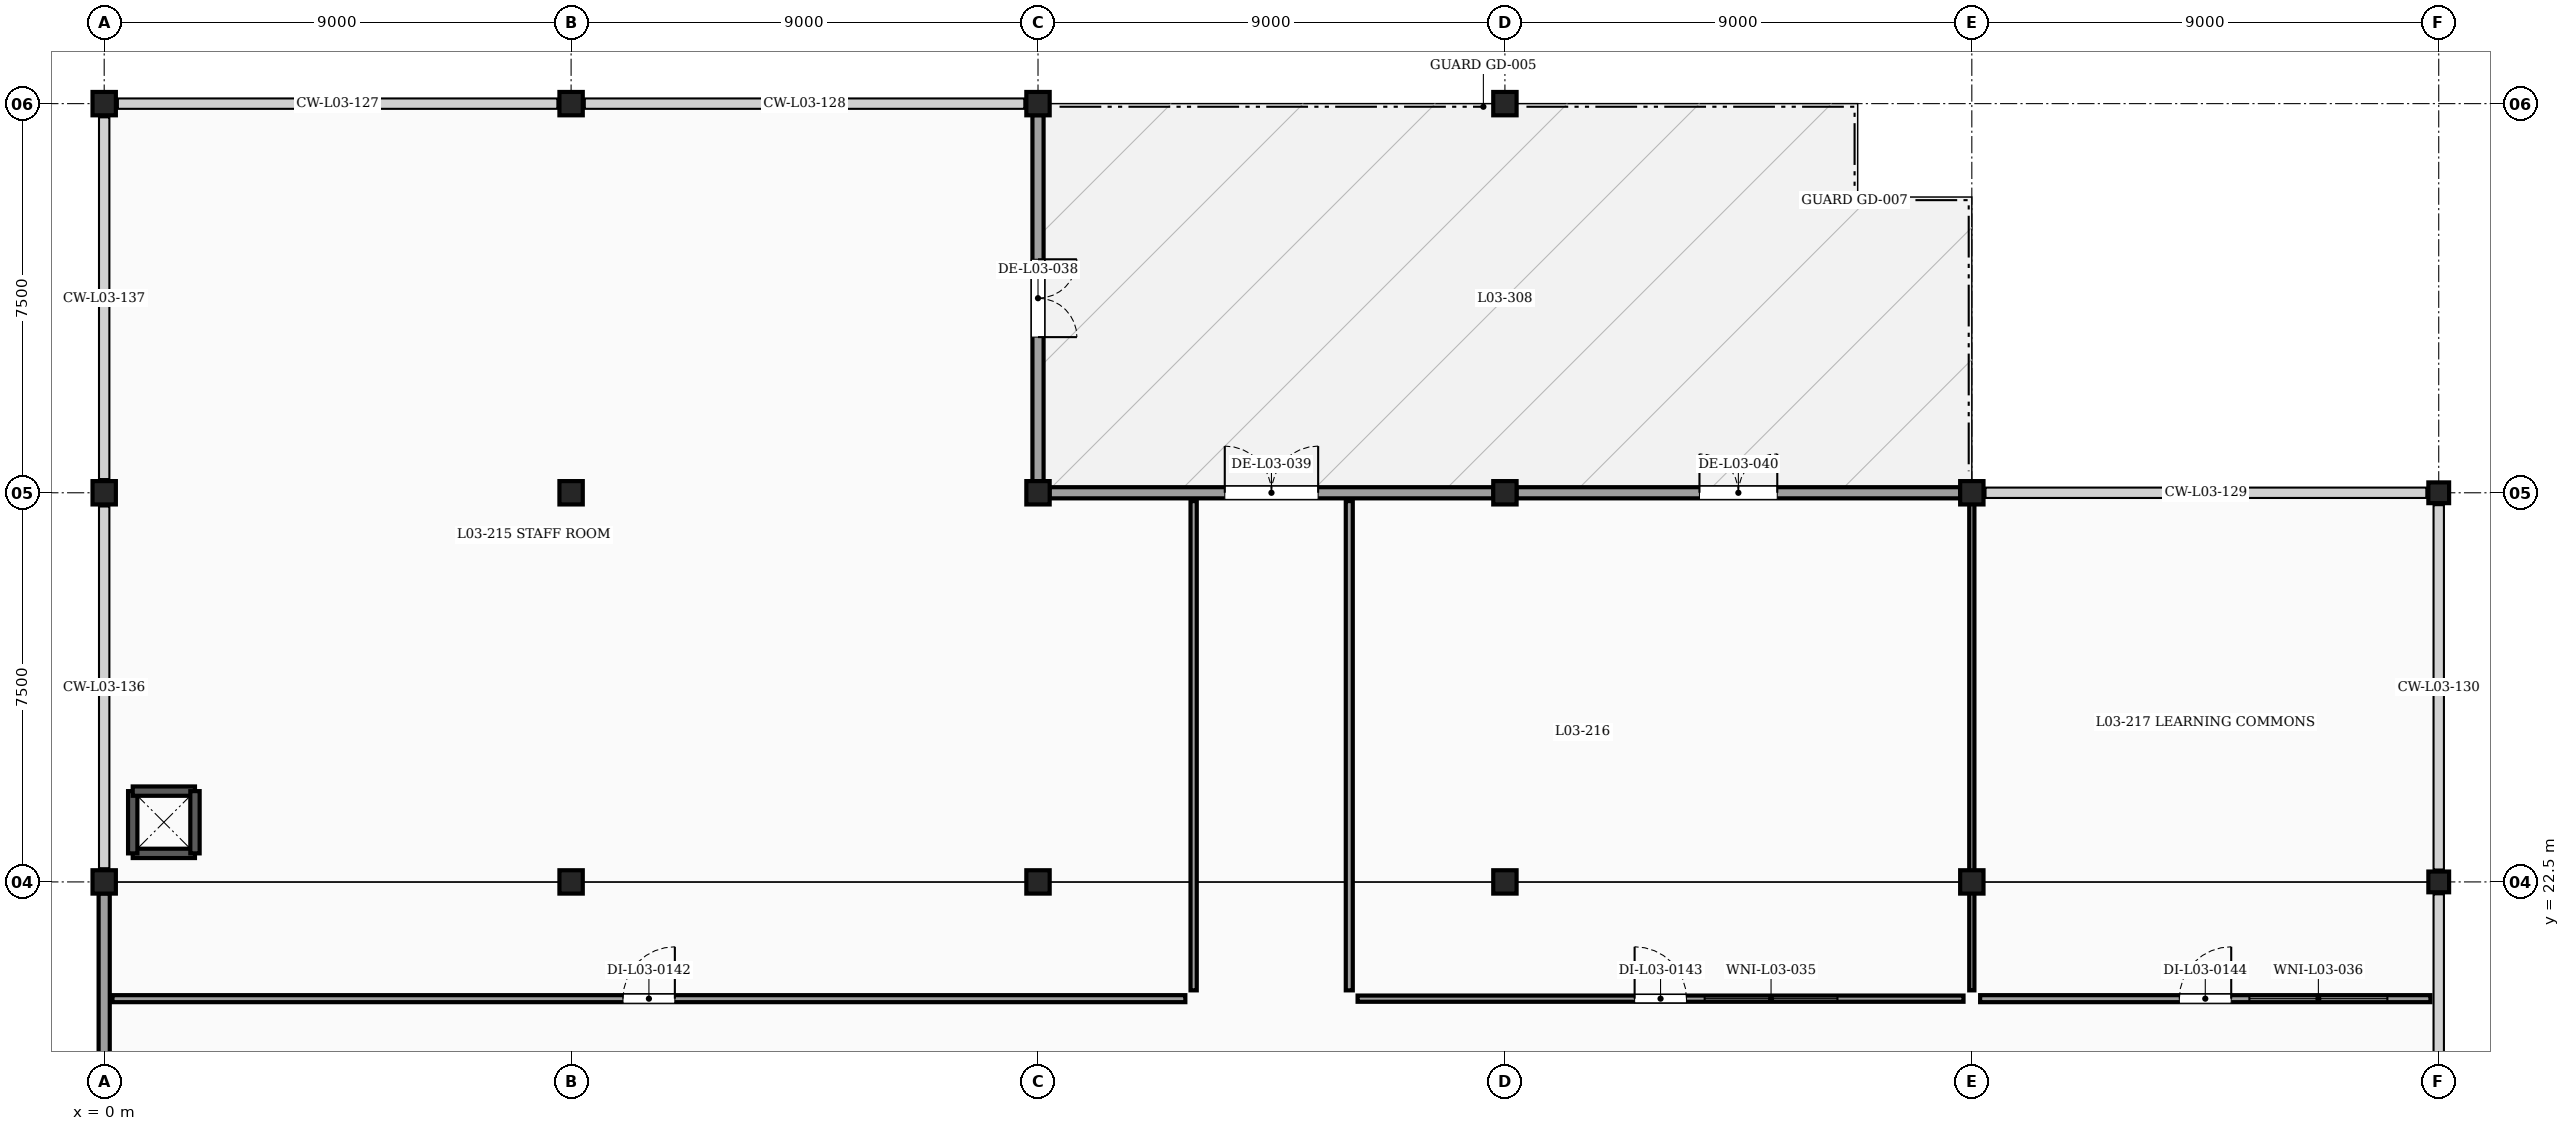
"""IFC4 building model, lengths in metres.
Left out: names, types, materials, properties, quantities, classifications, styles, units other than length and angle.
Written with IfcOpenShell. Run it as: python <this file> out.ifc"""

import sys

from ifc_helpers import new_model, si_unit, direction, frame, frame_2d, origin, origin_2d, place, context, subcontext, project, spatial, rectangle, extrude, element, fill, save


model = new_model("IFC4")
c1 = context("Model", 3, precision=1e-05, world=origin(), true_north=direction((0.0, 1.0)))
c2 = subcontext(c1, "Body", "Model", "MODEL_VIEW")
j1 = project(units=[si_unit("LENGTHUNIT", "METRE"), si_unit("PLANEANGLEUNIT", "RADIAN")], contexts=[c1])
p1 = place(None, origin())
s1 = spatial("IfcSite", under=j1, at=p1, CompositionType="ELEMENT")
p2 = place(p1, origin())
s2 = spatial("IfcBuilding", under=s1, at=p2, CompositionType="ELEMENT")
p3 = place(p2, frame((0.0, 0.0, 12.3)))
s3 = spatial("IfcBuildingStorey", under=s2, at=p3, CompositionType="ELEMENT", Elevation=12.3)
for number, where, z_axis, x_axis in (
    (1, (0.0, 22.5, 0.0), (0.0, 0.0, 1.0), (1.0, 0.0, 0.0)),
    (2, (9.0, 22.5, 0.0), (0.0, 0.0, 1.0), (1.0, 0.0, 0.0)),
    (3, (18.0, 22.5, 0.0), (0.0, 0.0, 1.0), (1.0, 0.0, 0.0)),
    (4, (27.0, 22.5, 0.0), (0.0, 0.0, 1.0), (1.0, 0.0, 0.0)),
    (5, (36.0, 22.5, 0.0), (0.0, 0.0, 1.0), (1.0, 0.0, 0.0)),
):
    element("IfcColumn", number, at=place(p3, frame(where, z_axis=z_axis, x_axis=x_axis)), inside=s3, PredefinedType="COLUMN", context=c2, shape_type="SweptSolid", body=[
        extrude(rectangle(XDim=0.45, YDim=0.45, at=origin_2d()), origin(), (0.0, 0.0, 1.0), 3.8),
    ])
p4 = place(p3, frame((45.0, 22.5, 0.0), z_axis=(0.0, 0.0, 1.0), x_axis=(1.0, 0.0, 0.0)))
e6 = element("IfcColumn", 6, at=p4, inside=s3, PredefinedType="COLUMN", context=c2, shape_type="SweptSolid", body=[
    extrude(rectangle(XDim=0.4, YDim=0.4, at=origin_2d()), origin(), (0.0, 0.0, 1.0), 3.8),
])
for number, where, z_axis, x_axis in (
    (7, (0.0, 30.0, 0.0), (0.0, 0.0, 1.0), (1.0, 0.0, 0.0)),
    (8, (9.0, 30.0, 0.0), (0.0, 0.0, 1.0), (1.0, 0.0, 0.0)),
    (9, (18.0, 30.0, 0.0), (0.0, 0.0, 1.0), (1.0, 0.0, 0.0)),
    (10, (27.0, 30.0, 0.0), (0.0, 0.0, 1.0), (1.0, 0.0, 0.0)),
    (11, (36.0, 30.0, 0.0), (0.0, 0.0, 1.0), (1.0, 0.0, 0.0)),
):
    element("IfcColumn", number, at=place(p3, frame(where, z_axis=z_axis, x_axis=x_axis)), inside=s3, PredefinedType="COLUMN", context=c2, shape_type="SweptSolid", body=[
        extrude(rectangle(XDim=0.45, YDim=0.45, at=origin_2d()), origin(), (0.0, 0.0, 1.0), 3.8),
    ])
p5 = place(p3, frame((45.0, 30.0, 0.0), z_axis=(0.0, 0.0, 1.0), x_axis=(1.0, 0.0, 0.0)))
e12 = element("IfcColumn", 12, at=p5, inside=s3, PredefinedType="COLUMN", context=c2, shape_type="SweptSolid", body=[
    extrude(rectangle(XDim=0.4, YDim=0.4, at=origin_2d()), origin(), (0.0, 0.0, 1.0), 3.8),
])
for number, where, z_axis, x_axis in (
    (13, (0.0, 37.5, 0.0), (0.0, 0.0, 1.0), (1.0, 0.0, 0.0)),
    (14, (9.0, 37.5, 0.0), (0.0, 0.0, 1.0), (1.0, 0.0, 0.0)),
    (15, (18.0, 37.5, 0.0), (0.0, 0.0, 1.0), (1.0, 0.0, 0.0)),
    (16, (27.0, 37.5, 0.0), (0.0, 0.0, 1.0), (1.0, 0.0, 0.0)),
):
    element("IfcColumn", number, at=place(p3, frame(where, z_axis=z_axis, x_axis=x_axis)), inside=s3, PredefinedType="COLUMN", context=c2, shape_type="SweptSolid", body=[
        extrude(rectangle(XDim=0.45, YDim=0.45, at=origin_2d()), origin(), (0.0, 0.0, 1.0), 3.8),
    ])
p6 = place(p3, frame((18.0, 37.279, 0.0), z_axis=(0.0, 0.0, 1.0), x_axis=(0.0, -1.0, 0.0)))
e17 = element("IfcWall", 17, at=p6, inside=s3, PredefinedType="SOLIDWALL", context=c2, shape_type="SweptSolid", body=[
    extrude(rectangle(XDim=7.058, YDim=0.215, at=frame_2d((3.529, 0.0))), origin(), (0.0, 0.0, 1.0), 3.054),
])
p7 = place(p6, frame((2.779, 0.0, 0.0)))
e18 = element("IfcOpeningElement", 18, at=p7, cuts=e17, PredefinedType="OPENING", context=c2, shape_type="SweptSolid", body=[
    extrude(rectangle(XDim=1.5, YDim=2.15, at=frame_2d((0.75, 1.075))), frame((0.0, 0.117, 0.0), z_axis=(0.0, -1.0, 0.0), x_axis=(1.0, 0.0, 0.0)), (0.0, 0.0, 1.0), 0.235),
])
p8 = place(p3, frame((18.221, 30.0, 0.0), z_axis=(0.0, 0.0, 1.0), x_axis=(1.0, 0.0, 0.0)))
e19 = element("IfcWall", 19, at=p8, inside=s3, PredefinedType="SOLIDWALL", context=c2, shape_type="SweptSolid", body=[
    extrude(rectangle(XDim=8.558, YDim=0.215, at=frame_2d((4.279, 0.0))), origin(), (0.0, 0.0, 1.0), 3.054),
])
p9 = place(p8, frame((3.379, 0.0, 0.0)))
e20 = element("IfcOpeningElement", 20, at=p9, cuts=e19, PredefinedType="OPENING", context=c2, shape_type="SweptSolid", body=[
    extrude(rectangle(XDim=1.8, YDim=2.2, at=frame_2d((0.9, 1.1))), frame((0.0, 0.117, 0.0), z_axis=(0.0, -1.0, 0.0), x_axis=(1.0, 0.0, 0.0)), (0.0, 0.0, 1.0), 0.235),
])
p10 = place(p3, frame((27.221, 30.0, 0.0), z_axis=(0.0, 0.0, 1.0), x_axis=(1.0, 0.0, 0.0)))
e21 = element("IfcWall", 21, at=p10, inside=s3, PredefinedType="SOLIDWALL", context=c2, shape_type="SweptSolid", body=[
    extrude(rectangle(XDim=8.558, YDim=0.215, at=frame_2d((4.279, 0.0))), origin(), (0.0, 0.0, 1.0), 2.997),
])
p11 = place(p10, frame((3.529, 0.0, 0.0)))
e22 = element("IfcOpeningElement", 22, at=p11, cuts=e21, PredefinedType="OPENING", context=c2, shape_type="SweptSolid", body=[
    extrude(rectangle(XDim=1.5, YDim=2.15, at=frame_2d((0.75, 1.075))), frame((0.0, 0.117, 0.0), z_axis=(0.0, -1.0, 0.0), x_axis=(1.0, 0.0, 0.0)), (0.0, 0.0, 1.0), 0.235),
])
p12 = place(p3, frame((0.0, 15.221, 0.0), z_axis=(0.0, 0.0, 1.0), x_axis=(0.0, 1.0, 0.0)))
e23 = element("IfcWall", 23, at=p12, inside=s3, PredefinedType="SOLIDWALL", context=c2, shape_type="SweptSolid", body=[
    extrude(rectangle(XDim=7.058, YDim=0.215, at=frame_2d((3.529, 0.0))), origin(), (0.0, 0.0, 1.0), 2.997),
])
for number, where, z_axis, x_axis in (
    (24, (1.75, 23.05, 0.0), (0.0, 0.0, 1.0), (-1.0, 0.0, 0.0)),
    (25, (0.55, 23.05, 0.0), (0.0, 0.0, 1.0), (0.0, 1.0, 0.0)),
    (26, (0.55, 24.25, 0.0), (0.0, 0.0, 1.0), (1.0, 0.0, 0.0)),
    (27, (1.75, 24.25, 0.0), (0.0, 0.0, 1.0), (0.0, -1.0, 0.0)),
):
    element("IfcWall", number, at=place(p3, frame(where, z_axis=z_axis, x_axis=x_axis)), inside=s3, PredefinedType="SHEAR", context=c2, shape_type="SweptSolid", body=[
        extrude(rectangle(XDim=1.2, YDim=0.18, at=frame_2d((0.6, 0.0))), origin(), (0.0, 0.0, 1.0), 3.59),
    ])
p13 = place(p3, frame((0.16, 20.25, 0.0), z_axis=(0.0, 0.0, 1.0), x_axis=(1.0, 0.0, 0.0)))
e28 = element("IfcWall", 28, at=p13, inside=s3, PredefinedType="PARTITIONING", context=c2, shape_type="SweptSolid", body=[
    extrude(rectangle(XDim=20.68, YDim=0.135, at=frame_2d((10.34, 0.0))), origin(), (0.0, 0.0, 1.0), 3.59),
])
p14 = place(p13, frame((9.84, 0.0, 0.0)))
e29 = element("IfcOpeningElement", 29, at=p14, cuts=e28, PredefinedType="OPENING", context=c2, shape_type="SweptSolid", body=[
    extrude(rectangle(XDim=1.0, YDim=2.15, at=frame_2d((0.5, 1.075))), frame((0.0, 0.077, 0.0), z_axis=(0.0, -1.0, 0.0), x_axis=(1.0, 0.0, 0.0)), (0.0, 0.0, 1.0), 0.155),
])
p15 = place(p3, frame((21.0, 20.41, 0.0), z_axis=(0.0, 0.0, 1.0), x_axis=(0.0, 1.0, 0.0)))
e30 = element("IfcWall", 30, at=p15, inside=s3, PredefinedType="PARTITIONING", context=c2, shape_type="SweptSolid", body=[
    extrude(rectangle(XDim=9.43, YDim=0.12, at=frame_2d((4.715, 0.0))), origin(), (0.0, 0.0, 1.0), 3.222),
])
p16 = place(p3, frame((24.0, 29.84, 0.0), z_axis=(0.0, 0.0, 1.0), x_axis=(0.0, -1.0, 0.0)))
e31 = element("IfcWall", 31, at=p16, inside=s3, PredefinedType="PARTITIONING", context=c2, shape_type="SweptSolid", body=[
    extrude(rectangle(XDim=9.43, YDim=0.135, at=frame_2d((4.715, 0.0))), origin(), (0.0, 0.0, 1.0), 3.222),
])
p17 = place(p3, frame((24.16, 20.25, 0.0), z_axis=(0.0, 0.0, 1.0), x_axis=(1.0, 0.0, 0.0)))
e32 = element("IfcWall", 32, at=p17, inside=s3, PredefinedType="PARTITIONING", context=c2, shape_type="SweptSolid", body=[
    extrude(rectangle(XDim=11.68, YDim=0.12, at=frame_2d((5.84, 0.0))), origin(), (0.0, 0.0, 1.0), 3.59),
])
p18 = place(p17, frame((5.34, 0.0, 0.0)))
e33 = element("IfcOpeningElement", 33, at=p18, cuts=e32, PredefinedType="OPENING", context=c2, shape_type="SweptSolid", body=[
    extrude(rectangle(XDim=1.0, YDim=2.15, at=frame_2d((0.5, 1.075))), frame((0.0, 0.07, 0.0), z_axis=(0.0, -1.0, 0.0), x_axis=(1.0, 0.0, 0.0)), (0.0, 0.0, 1.0), 0.14),
])
p19 = place(p17, frame((6.69, 0.0, 1.02)))
e34 = element("IfcOpeningElement", 34, at=p19, cuts=e32, PredefinedType="OPENING", context=c2, shape_type="SweptSolid", body=[
    extrude(rectangle(XDim=2.56, YDim=1.14, at=frame_2d((1.28, 0.57))), frame((0.0, 0.07, 0.0), z_axis=(0.0, -1.0, 0.0), x_axis=(1.0, 0.0, 0.0)), (0.0, 0.0, 1.0), 0.14),
])
p20 = place(p3, frame((36.16, 20.25, 0.0), z_axis=(0.0, 0.0, 1.0), x_axis=(1.0, 0.0, 0.0)))
e35 = element("IfcWall", 35, at=p20, inside=s3, PredefinedType="PARTITIONING", context=c2, shape_type="SweptSolid", body=[
    extrude(rectangle(XDim=8.68, YDim=0.135, at=frame_2d((4.34, 0.0))), origin(), (0.0, 0.0, 1.0), 3.59),
])
p21 = place(p20, frame((3.84, 0.0, 0.0)))
e36 = element("IfcOpeningElement", 36, at=p21, cuts=e35, PredefinedType="OPENING", context=c2, shape_type="SweptSolid", body=[
    extrude(rectangle(XDim=1.0, YDim=2.15, at=frame_2d((0.5, 1.075))), frame((0.0, 0.077, 0.0), z_axis=(0.0, -1.0, 0.0), x_axis=(1.0, 0.0, 0.0)), (0.0, 0.0, 1.0), 0.155),
])
p22 = place(p20, frame((5.19, 0.0, 1.02)))
e37 = element("IfcOpeningElement", 37, at=p22, cuts=e35, PredefinedType="OPENING", context=c2, shape_type="SweptSolid", body=[
    extrude(rectangle(XDim=2.66, YDim=1.12, at=frame_2d((1.33, 0.56))), frame((0.0, 0.077, 0.0), z_axis=(0.0, -1.0, 0.0), x_axis=(1.0, 0.0, 0.0)), (0.0, 0.0, 1.0), 0.155),
])
p23 = place(p3, frame((36.0, 20.41, 0.0), z_axis=(0.0, 0.0, 1.0), x_axis=(0.0, 1.0, 0.0)))
e38 = element("IfcWall", 38, at=p23, inside=s3, PredefinedType="PARTITIONING", context=c2, shape_type="SweptSolid", body=[
    extrude(rectangle(XDim=9.43, YDim=0.1, at=frame_2d((4.715, 0.0))), origin(), (0.0, 0.0, 1.0), 2.997),
])
p24 = place(p7, origin())
e39 = element("IfcDoor", 39, at=p24, inside=s3, OperationType="DOUBLE_DOOR_SINGLE_SWING", PredefinedType="DOOR", context=c2, shape_type="SweptSolid", body=[
    extrude(rectangle(XDim=1.5, YDim=2.15, at=frame_2d((0.75, 1.075))), frame((0.0, 0.025, 0.0), z_axis=(0.0, -1.0, 0.0), x_axis=(1.0, 0.0, 0.0)), (0.0, 0.0, 1.0), 0.05),
])
fill(e18, e39)
p25 = place(p9, origin())
e40 = element("IfcDoor", 40, at=p25, inside=s3, OperationType="DOUBLE_DOOR_SINGLE_SWING", PredefinedType="DOOR", context=c2, shape_type="SweptSolid", body=[
    extrude(rectangle(XDim=1.8, YDim=2.2, at=frame_2d((0.9, 1.1))), frame((0.0, 0.025, 0.0), z_axis=(0.0, -1.0, 0.0), x_axis=(1.0, 0.0, 0.0)), (0.0, 0.0, 1.0), 0.05),
])
fill(e20, e40)
p26 = place(p11, origin())
e41 = element("IfcDoor", 41, at=p26, inside=s3, OperationType="DOUBLE_DOOR_SINGLE_SWING", PredefinedType="DOOR", context=c2, shape_type="SweptSolid", body=[
    extrude(rectangle(XDim=1.5, YDim=2.15, at=frame_2d((0.75, 1.075))), frame((0.0, 0.025, 0.0), z_axis=(0.0, -1.0, 0.0), x_axis=(1.0, 0.0, 0.0)), (0.0, 0.0, 1.0), 0.05),
])
fill(e22, e41)
p27 = place(p14, origin())
e42 = element("IfcDoor", 42, at=p27, inside=s3, OperationType="SINGLE_SWING_RIGHT", PredefinedType="DOOR", context=c2, shape_type="SweptSolid", body=[
    extrude(rectangle(XDim=1.0, YDim=2.15, at=frame_2d((0.5, 1.075))), frame((0.0, 0.025, 0.0), z_axis=(0.0, -1.0, 0.0), x_axis=(1.0, 0.0, 0.0)), (0.0, 0.0, 1.0), 0.05),
])
fill(e29, e42)
p28 = place(p18, origin())
e43 = element("IfcDoor", 43, at=p28, inside=s3, OperationType="SINGLE_SWING_LEFT", PredefinedType="DOOR", context=c2, shape_type="SweptSolid", body=[
    extrude(rectangle(XDim=1.0, YDim=2.15, at=frame_2d((0.5, 1.075))), frame((0.0, 0.025, 0.0), z_axis=(0.0, -1.0, 0.0), x_axis=(1.0, 0.0, 0.0)), (0.0, 0.0, 1.0), 0.05),
])
fill(e33, e43)
p29 = place(p19, origin())
e44 = element("IfcWindow", 44, at=p29, inside=s3, PartitioningType="DOUBLE_PANEL_VERTICAL", PredefinedType="WINDOW", context=c2, shape_type="SweptSolid", body=[
    extrude(rectangle(XDim=2.56, YDim=1.14, at=frame_2d((1.28, 0.57))), frame((0.0, 0.03, 0.0), z_axis=(0.0, -1.0, 0.0), x_axis=(1.0, 0.0, 0.0)), (0.0, 0.0, 1.0), 0.06),
])
fill(e34, e44)
p30 = place(p21, origin())
e45 = element("IfcDoor", 45, at=p30, inside=s3, OperationType="SINGLE_SWING_RIGHT", PredefinedType="DOOR", context=c2, shape_type="SweptSolid", body=[
    extrude(rectangle(XDim=1.0, YDim=2.15, at=frame_2d((0.5, 1.075))), frame((0.0, 0.025, 0.0), z_axis=(0.0, -1.0, 0.0), x_axis=(1.0, 0.0, 0.0)), (0.0, 0.0, 1.0), 0.05),
])
fill(e36, e45)
p31 = place(p22, origin())
e46 = element("IfcWindow", 46, at=p31, inside=s3, PartitioningType="DOUBLE_PANEL_VERTICAL", PredefinedType="WINDOW", context=c2, shape_type="SweptSolid", body=[
    extrude(rectangle(XDim=2.66, YDim=1.12, at=frame_2d((1.33, 0.56))), frame((0.0, 0.03, 0.0), z_axis=(0.0, -1.0, 0.0), x_axis=(1.0, 0.0, 0.0)), (0.0, 0.0, 1.0), 0.06),
])
fill(e37, e46)
save(model, sys.argv[1])
